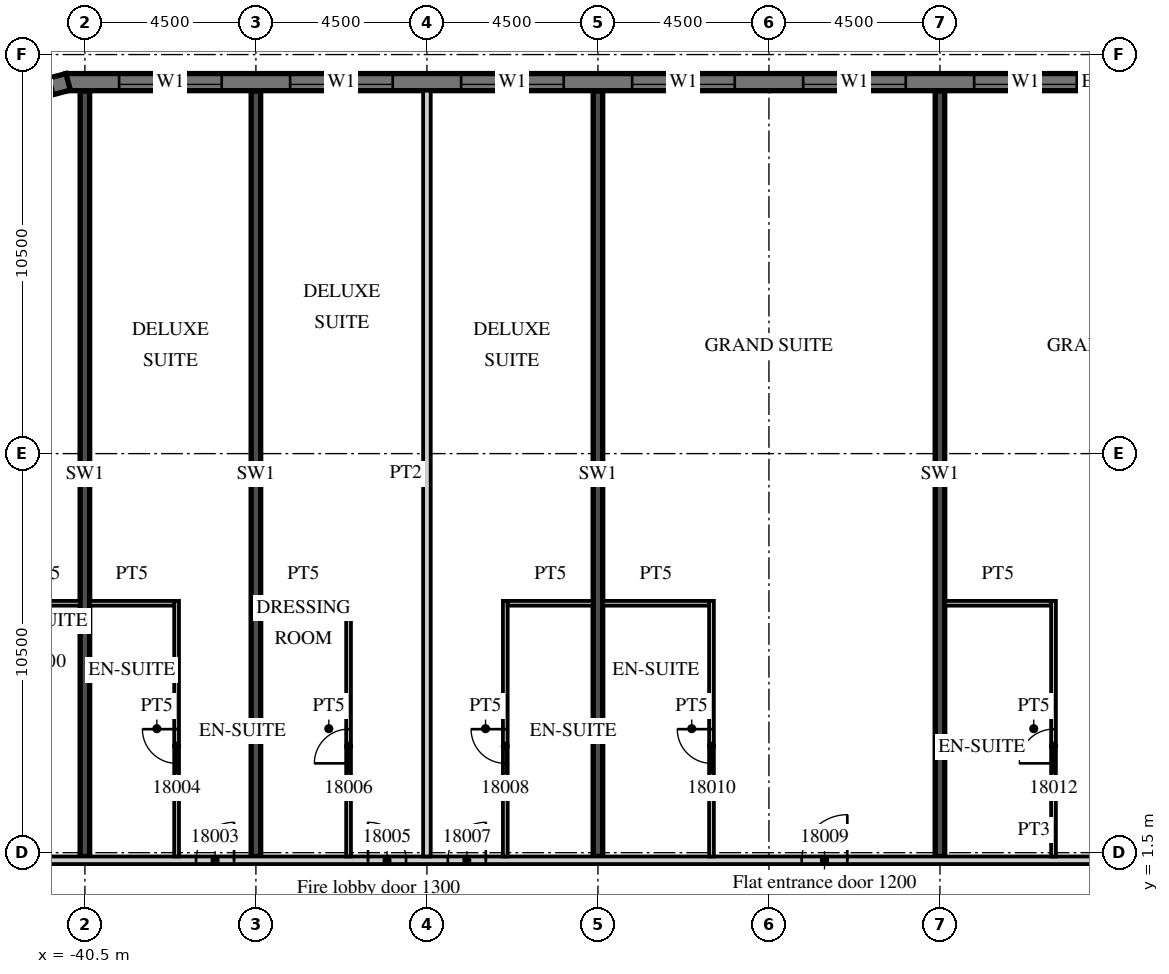
"""IFC4 building model, lengths in metres.
Left out: names, types, materials, properties, quantities, classifications, styles, units other than length and angle.
Written with IfcOpenShell. Run it as: python <this file> out.ifc"""

import sys

from ifc_helpers import new_model, si_unit, direction, frame, frame_2d, origin, place, context, subcontext, project, spatial, polyline, rectangle, outline, extrude, element, fill, save


model = new_model("IFC4")
c1 = context("Model", 3, precision=1e-05, world=origin(), true_north=direction((0.0, 1.0)))
c2 = subcontext(c1, "Body", "Model", "MODEL_VIEW")
j1 = project(units=[si_unit("LENGTHUNIT", "METRE"), si_unit("PLANEANGLEUNIT", "RADIAN")], contexts=[c1])
p1 = place(None, origin())
s1 = spatial("IfcSite", under=j1, at=p1, CompositionType="ELEMENT")
p2 = place(p1, origin())
s2 = spatial("IfcBuilding", under=s1, at=p2, CompositionType="ELEMENT")
p3 = place(p2, frame((0.0, 0.0, 89.7)))
s3 = spatial("IfcBuildingStorey", under=s2, at=p3, CompositionType="ELEMENT", Elevation=89.7)
for number, where, z_axis, x_axis in (
    (1, (-40.5, 1.4, 0.0), (0.0, 0.0, 1.0), (0.0, 1.0, 0.0)),
    (2, (-36.0, 1.4, 0.0), (0.0, 0.0, 1.0), (0.0, 1.0, 0.0)),
    (3, (-27.0, 1.4, 0.0), (0.0, 0.0, 1.0), (0.0, 1.0, 0.0)),
    (4, (-18.0, 1.4, 0.0), (0.0, 0.0, 1.0), (0.0, 1.0, 0.0)),
):
    element("IfcWall", number, at=place(p3, frame(where, z_axis=z_axis, x_axis=x_axis)), inside=s3, PredefinedType="SHEAR", context=c2, shape_type="SweptSolid", body=[
        extrude(rectangle(XDim=20.14, YDim=0.25, at=frame_2d((10.07, 0.0))), origin(), (0.0, 0.0, 1.0), 3.3),
    ])
p4 = place(p3, frame((13.5, 21.775, 0.0), z_axis=(0.0, 0.0, 1.0), x_axis=(-1.0, 0.0, 0.0)))
e5 = element("IfcWall", 5, at=p4, inside=s3, PredefinedType="SOLIDWALL", context=c2, shape_type="SweptSolid", body=[
    extrude(rectangle(XDim=54.5, YDim=0.45, at=frame_2d((27.25, 0.0))), origin(), (0.0, 0.0, 1.0), 3.02),
])
p5 = place(p4, frame((0.9, 0.0, 0.45)))
e6 = element("IfcOpeningElement", 6, at=p5, cuts=e5, PredefinedType="OPENING", context=c2, shape_type="SweptSolid", body=[
    extrude(rectangle(XDim=2.7, YDim=2.25, at=frame_2d((1.35, 1.125))), frame((0.0, 0.235, 0.0), z_axis=(0.0, -1.0, 0.0), x_axis=(1.0, 0.0, 0.0)), (0.0, 0.0, 1.0), 0.47),
])
p6 = place(p4, frame((5.4, 0.0, 0.45)))
e7 = element("IfcOpeningElement", 7, at=p6, cuts=e5, PredefinedType="OPENING", context=c2, shape_type="SweptSolid", body=[
    extrude(rectangle(XDim=2.7, YDim=2.25, at=frame_2d((1.35, 1.125))), frame((0.0, 0.235, 0.0), z_axis=(0.0, -1.0, 0.0), x_axis=(1.0, 0.0, 0.0)), (0.0, 0.0, 1.0), 0.47),
])
p7 = place(p4, frame((9.9, 0.0, 0.45)))
e8 = element("IfcOpeningElement", 8, at=p7, cuts=e5, PredefinedType="OPENING", context=c2, shape_type="SweptSolid", body=[
    extrude(rectangle(XDim=2.7, YDim=2.25, at=frame_2d((1.35, 1.125))), frame((0.0, 0.235, 0.0), z_axis=(0.0, -1.0, 0.0), x_axis=(1.0, 0.0, 0.0)), (0.0, 0.0, 1.0), 0.47),
])
p8 = place(p4, frame((14.4, 0.0, 0.45)))
e9 = element("IfcOpeningElement", 9, at=p8, cuts=e5, PredefinedType="OPENING", context=c2, shape_type="SweptSolid", body=[
    extrude(rectangle(XDim=2.7, YDim=2.25, at=frame_2d((1.35, 1.125))), frame((0.0, 0.235, 0.0), z_axis=(0.0, -1.0, 0.0), x_axis=(1.0, 0.0, 0.0)), (0.0, 0.0, 1.0), 0.47),
])
p9 = place(p4, frame((18.9, 0.0, 0.45)))
e10 = element("IfcOpeningElement", 10, at=p9, cuts=e5, PredefinedType="OPENING", context=c2, shape_type="SweptSolid", body=[
    extrude(rectangle(XDim=2.7, YDim=2.25, at=frame_2d((1.35, 1.125))), frame((0.0, 0.235, 0.0), z_axis=(0.0, -1.0, 0.0), x_axis=(1.0, 0.0, 0.0)), (0.0, 0.0, 1.0), 0.47),
])
p10 = place(p4, frame((23.4, 0.0, 0.45)))
e11 = element("IfcOpeningElement", 11, at=p10, cuts=e5, PredefinedType="OPENING", context=c2, shape_type="SweptSolid", body=[
    extrude(rectangle(XDim=2.7, YDim=2.25, at=frame_2d((1.35, 1.125))), frame((0.0, 0.235, 0.0), z_axis=(0.0, -1.0, 0.0), x_axis=(1.0, 0.0, 0.0)), (0.0, 0.0, 1.0), 0.47),
])
p11 = place(p4, frame((27.9, 0.0, 0.45)))
e12 = element("IfcOpeningElement", 12, at=p11, cuts=e5, PredefinedType="OPENING", context=c2, shape_type="SweptSolid", body=[
    extrude(rectangle(XDim=2.7, YDim=2.25, at=frame_2d((1.35, 1.125))), frame((0.0, 0.235, 0.0), z_axis=(0.0, -1.0, 0.0), x_axis=(1.0, 0.0, 0.0)), (0.0, 0.0, 1.0), 0.47),
])
p12 = place(p4, frame((32.4, 0.0, 0.45)))
e13 = element("IfcOpeningElement", 13, at=p12, cuts=e5, PredefinedType="OPENING", context=c2, shape_type="SweptSolid", body=[
    extrude(rectangle(XDim=2.7, YDim=2.25, at=frame_2d((1.35, 1.125))), frame((0.0, 0.235, 0.0), z_axis=(0.0, -1.0, 0.0), x_axis=(1.0, 0.0, 0.0)), (0.0, 0.0, 1.0), 0.47),
])
p13 = place(p4, frame((36.9, 0.0, 0.45)))
e14 = element("IfcOpeningElement", 14, at=p13, cuts=e5, PredefinedType="OPENING", context=c2, shape_type="SweptSolid", body=[
    extrude(rectangle(XDim=2.7, YDim=2.25, at=frame_2d((1.35, 1.125))), frame((0.0, 0.235, 0.0), z_axis=(0.0, -1.0, 0.0), x_axis=(1.0, 0.0, 0.0)), (0.0, 0.0, 1.0), 0.47),
])
p14 = place(p4, frame((41.4, 0.0, 0.45)))
e15 = element("IfcOpeningElement", 15, at=p14, cuts=e5, PredefinedType="OPENING", context=c2, shape_type="SweptSolid", body=[
    extrude(rectangle(XDim=2.7, YDim=2.25, at=frame_2d((1.35, 1.125))), frame((0.0, 0.235, 0.0), z_axis=(0.0, -1.0, 0.0), x_axis=(1.0, 0.0, 0.0)), (0.0, 0.0, 1.0), 0.47),
])
p15 = place(p4, frame((45.9, 0.0, 0.45)))
e16 = element("IfcOpeningElement", 16, at=p15, cuts=e5, PredefinedType="OPENING", context=c2, shape_type="SweptSolid", body=[
    extrude(rectangle(XDim=2.7, YDim=2.25, at=frame_2d((1.35, 1.125))), frame((0.0, 0.235, 0.0), z_axis=(0.0, -1.0, 0.0), x_axis=(1.0, 0.0, 0.0)), (0.0, 0.0, 1.0), 0.47),
])
p16 = place(p4, frame((50.4, 0.0, 0.45)))
e17 = element("IfcOpeningElement", 17, at=p16, cuts=e5, PredefinedType="OPENING", context=c2, shape_type="SweptSolid", body=[
    extrude(rectangle(XDim=2.7, YDim=2.25, at=frame_2d((1.35, 1.125))), frame((0.0, 0.235, 0.0), z_axis=(0.0, -1.0, 0.0), x_axis=(1.0, 0.0, 0.0)), (0.0, 0.0, 1.0), 0.47),
])
p17 = place(p3, frame((-40.942, 21.783, 0.0), z_axis=(0.0, 0.0, 1.0), x_axis=(-0.965926999034, -0.25881466832, 0.0)))
e18 = element("IfcWall", 18, at=p17, inside=s3, PredefinedType="SOLIDWALL", context=c2, shape_type="SweptSolid", body=[
    extrude(outline(polyline([(0.0, -0.225), (2.071, -0.225), (1.95, 0.225), (0.121, 0.225), (0.0, -0.225)])), origin(), (0.0, 0.0, 1.0), 3.02),
])
p18 = place(p17, frame((0.435, 0.0, 0.45)))
e19 = element("IfcOpeningElement", 19, at=p18, cuts=e18, PredefinedType="OPENING", context=c2, shape_type="SweptSolid", body=[
    extrude(rectangle(XDim=1.2, YDim=2.25, at=frame_2d((0.6, 1.125))), frame((0.0, 0.235, 0.0), z_axis=(0.0, -1.0, 0.0), x_axis=(1.0, 0.0, 0.0)), (0.0, 0.0, 1.0), 0.47),
])
p19 = place(p3, frame((-44.55, 1.3, 0.0), z_axis=(0.0, 0.0, 1.0), x_axis=(1.0, 0.0, 0.0)))
e20 = element("IfcWall", 20, at=p19, inside=s3, PredefinedType="PARTITIONING", context=c2, shape_type="SweptSolid", body=[
    extrude(rectangle(XDim=58.05, YDim=0.2, at=frame_2d((29.025, 0.0))), origin(), (0.0, 0.0, 1.0), 3.02),
])
p20 = place(p19, frame((0.525, 0.0, 0.0)))
e21 = element("IfcOpeningElement", 21, at=p20, cuts=e20, PredefinedType="OPENING", context=c2, shape_type="SweptSolid", body=[
    extrude(rectangle(XDim=1.0, YDim=2.1, at=frame_2d((0.5, 1.05))), frame((0.0, 0.11, 0.0), z_axis=(0.0, -1.0, 0.0), x_axis=(1.0, 0.0, 0.0)), (0.0, 0.0, 1.0), 0.22),
])
p21 = place(p19, frame((6.975, 0.0, 0.0)))
e22 = element("IfcOpeningElement", 22, at=p21, cuts=e20, PredefinedType="OPENING", context=c2, shape_type="SweptSolid", body=[
    extrude(rectangle(XDim=1.0, YDim=2.1, at=frame_2d((0.5, 1.05))), frame((0.0, 0.11, 0.0), z_axis=(0.0, -1.0, 0.0), x_axis=(1.0, 0.0, 0.0)), (0.0, 0.0, 1.0), 0.22),
])
p22 = place(p19, frame((11.5, 0.0, 0.0)))
e23 = element("IfcOpeningElement", 23, at=p22, cuts=e20, PredefinedType="OPENING", context=c2, shape_type="SweptSolid", body=[
    extrude(rectangle(XDim=1.0, YDim=2.1, at=frame_2d((0.5, 1.05))), frame((0.0, 0.11, 0.0), z_axis=(0.0, -1.0, 0.0), x_axis=(1.0, 0.0, 0.0)), (0.0, 0.0, 1.0), 0.22),
])
p23 = place(p19, frame((13.6, 0.0, 0.0)))
e24 = element("IfcOpeningElement", 24, at=p23, cuts=e20, PredefinedType="OPENING", context=c2, shape_type="SweptSolid", body=[
    extrude(rectangle(XDim=1.0, YDim=2.1, at=frame_2d((0.5, 1.05))), frame((0.0, 0.11, 0.0), z_axis=(0.0, -1.0, 0.0), x_axis=(1.0, 0.0, 0.0)), (0.0, 0.0, 1.0), 0.22),
])
p24 = place(p19, frame((22.912, 0.0, 0.0)))
e25 = element("IfcOpeningElement", 25, at=p24, cuts=e20, PredefinedType="OPENING", context=c2, shape_type="SweptSolid", body=[
    extrude(rectangle(XDim=1.2, YDim=2.1, at=frame_2d((0.6, 1.05))), frame((0.0, 0.11, 0.0), z_axis=(0.0, -1.0, 0.0), x_axis=(1.0, 0.0, 0.0)), (0.0, 0.0, 1.0), 0.22),
])
p25 = place(p19, frame((31.912, 0.0, 0.0)))
e26 = element("IfcOpeningElement", 26, at=p25, cuts=e20, PredefinedType="OPENING", context=c2, shape_type="SweptSolid", body=[
    extrude(rectangle(XDim=1.2, YDim=2.1, at=frame_2d((0.6, 1.05))), frame((0.0, 0.11, 0.0), z_axis=(0.0, -1.0, 0.0), x_axis=(1.0, 0.0, 0.0)), (0.0, 0.0, 1.0), 0.22),
])
p26 = place(p19, frame((37.987, 0.0, 0.0)))
e27 = element("IfcOpeningElement", 27, at=p26, cuts=e20, PredefinedType="OPENING", context=c2, shape_type="SweptSolid", body=[
    extrude(rectangle(XDim=1.2, YDim=2.1, at=frame_2d((0.6, 1.05))), frame((0.0, 0.11, 0.0), z_axis=(0.0, -1.0, 0.0), x_axis=(1.0, 0.0, 0.0)), (0.0, 0.0, 1.0), 0.22),
])
p27 = place(p19, frame((46.987, 0.0, 0.0)))
e28 = element("IfcOpeningElement", 28, at=p27, cuts=e20, PredefinedType="OPENING", context=c2, shape_type="SweptSolid", body=[
    extrude(rectangle(XDim=1.2, YDim=2.1, at=frame_2d((0.6, 1.05))), frame((0.0, 0.11, 0.0), z_axis=(0.0, -1.0, 0.0), x_axis=(1.0, 0.0, 0.0)), (0.0, 0.0, 1.0), 0.22),
])
p28 = place(p19, frame((54.125, 0.0, 0.0)))
e29 = element("IfcOpeningElement", 29, at=p28, cuts=e20, PredefinedType="OPENING", context=c2, shape_type="SweptSolid", body=[
    extrude(rectangle(XDim=1.0, YDim=2.1, at=frame_2d((0.5, 1.05))), frame((0.0, 0.11, 0.0), z_axis=(0.0, -1.0, 0.0), x_axis=(1.0, 0.0, 0.0)), (0.0, 0.0, 1.0), 0.22),
])
p29 = place(p3, frame((-42.525, 8.062, 0.0), z_axis=(0.0, 0.0, 1.0), x_axis=(1.0, 0.0, 0.0)))
e30 = element("IfcWall", 30, at=p29, inside=s3, PredefinedType="PARTITIONING", context=c2, shape_type="SweptSolid", body=[
    extrude(rectangle(XDim=1.9, YDim=0.125, at=frame_2d((0.95, 0.0))), origin(), (0.0, 0.0, 1.0), 3.02),
])
p30 = place(p3, frame((-38.087, 1.4, 0.0), z_axis=(0.0, 0.0, 1.0), x_axis=(0.0, 1.0, 0.0)))
e31 = element("IfcWall", 31, at=p30, inside=s3, PredefinedType="PARTITIONING", context=c2, shape_type="SweptSolid", body=[
    extrude(rectangle(XDim=6.725, YDim=0.125, at=frame_2d((3.363, 0.0))), origin(), (0.0, 0.0, 1.0), 3.02),
])
p31 = place(p30, frame((2.45, 0.0, 0.0)))
e32 = element("IfcOpeningElement", 32, at=p31, cuts=e31, PredefinedType="OPENING", context=c2, shape_type="SweptSolid", body=[
    extrude(rectangle(XDim=0.9, YDim=2.1, at=frame_2d((0.45, 1.05))), frame((0.0, 0.073, 0.0), z_axis=(0.0, -1.0, 0.0), x_axis=(1.0, 0.0, 0.0)), (0.0, 0.0, 1.0), 0.145),
])
p32 = place(p3, frame((-40.375, 8.062, 0.0), z_axis=(0.0, 0.0, 1.0), x_axis=(1.0, 0.0, 0.0)))
e33 = element("IfcWall", 33, at=p32, inside=s3, PredefinedType="PARTITIONING", context=c2, shape_type="SweptSolid", body=[
    extrude(rectangle(XDim=2.225, YDim=0.125, at=frame_2d((1.113, 0.0))), origin(), (0.0, 0.0, 1.0), 3.02),
])
p33 = place(p3, frame((-31.5, 1.4, 0.0), z_axis=(0.0, 0.0, 1.0), x_axis=(0.0, 1.0, 0.0)))
e34 = element("IfcWall", 34, at=p33, inside=s3, PredefinedType="PARTITIONING", context=c2, shape_type="SweptSolid", body=[
    extrude(rectangle(XDim=20.15, YDim=0.2, at=frame_2d((10.075, 0.0))), origin(), (0.0, 0.0, 1.0), 3.02),
])
p34 = place(p3, frame((-33.562, 1.4, 0.0), z_axis=(0.0, 0.0, 1.0), x_axis=(0.0, 1.0, 0.0)))
e35 = element("IfcWall", 35, at=p34, inside=s3, PredefinedType="PARTITIONING", context=c2, shape_type="SweptSolid", body=[
    extrude(rectangle(XDim=6.725, YDim=0.125, at=frame_2d((3.363, 0.0))), origin(), (0.0, 0.0, 1.0), 3.02),
])
p35 = place(p34, frame((2.45, 0.0, 0.0)))
e36 = element("IfcOpeningElement", 36, at=p35, cuts=e35, PredefinedType="OPENING", context=c2, shape_type="SweptSolid", body=[
    extrude(rectangle(XDim=0.9, YDim=2.1, at=frame_2d((0.45, 1.05))), frame((0.0, 0.073, 0.0), z_axis=(0.0, -1.0, 0.0), x_axis=(1.0, 0.0, 0.0)), (0.0, 0.0, 1.0), 0.145),
])
p36 = place(p3, frame((-35.875, 8.062, 0.0), z_axis=(0.0, 0.0, 1.0), x_axis=(1.0, 0.0, 0.0)))
e37 = element("IfcWall", 37, at=p36, inside=s3, PredefinedType="PARTITIONING", context=c2, shape_type="SweptSolid", body=[
    extrude(rectangle(XDim=2.25, YDim=0.125, at=frame_2d((1.125, 0.0))), origin(), (0.0, 0.0, 1.0), 3.02),
])
p37 = place(p3, frame((-29.438, 1.4, 0.0), z_axis=(0.0, 0.0, 1.0), x_axis=(0.0, 1.0, 0.0)))
e38 = element("IfcWall", 38, at=p37, inside=s3, PredefinedType="PARTITIONING", context=c2, shape_type="SweptSolid", body=[
    extrude(rectangle(XDim=6.725, YDim=0.125, at=frame_2d((3.363, 0.0))), origin(), (0.0, 0.0, 1.0), 3.02),
])
p38 = place(p37, frame((2.45, 0.0, 0.0)))
e39 = element("IfcOpeningElement", 39, at=p38, cuts=e38, PredefinedType="OPENING", context=c2, shape_type="SweptSolid", body=[
    extrude(rectangle(XDim=0.9, YDim=2.1, at=frame_2d((0.45, 1.05))), frame((0.0, 0.073, 0.0), z_axis=(0.0, -1.0, 0.0), x_axis=(1.0, 0.0, 0.0)), (0.0, 0.0, 1.0), 0.145),
])
p39 = place(p3, frame((-29.375, 8.062, 0.0), z_axis=(0.0, 0.0, 1.0), x_axis=(1.0, 0.0, 0.0)))
e40 = element("IfcWall", 40, at=p39, inside=s3, PredefinedType="PARTITIONING", context=c2, shape_type="SweptSolid", body=[
    extrude(rectangle(XDim=2.25, YDim=0.125, at=frame_2d((1.125, 0.0))), origin(), (0.0, 0.0, 1.0), 3.02),
])
p40 = place(p3, frame((-24.012, 1.4, 0.0), z_axis=(0.0, 0.0, 1.0), x_axis=(0.0, 1.0, 0.0)))
e41 = element("IfcWall", 41, at=p40, inside=s3, PredefinedType="PARTITIONING", context=c2, shape_type="SweptSolid", body=[
    extrude(rectangle(XDim=6.725, YDim=0.125, at=frame_2d((3.363, 0.0))), origin(), (0.0, 0.0, 1.0), 3.02),
])
p41 = place(p40, frame((2.45, 0.0, 0.0)))
e42 = element("IfcOpeningElement", 42, at=p41, cuts=e41, PredefinedType="OPENING", context=c2, shape_type="SweptSolid", body=[
    extrude(rectangle(XDim=0.9, YDim=2.1, at=frame_2d((0.45, 1.05))), frame((0.0, 0.073, 0.0), z_axis=(0.0, -1.0, 0.0), x_axis=(1.0, 0.0, 0.0)), (0.0, 0.0, 1.0), 0.145),
])
p42 = place(p3, frame((-26.875, 8.062, 0.0), z_axis=(0.0, 0.0, 1.0), x_axis=(1.0, 0.0, 0.0)))
e43 = element("IfcWall", 43, at=p42, inside=s3, PredefinedType="PARTITIONING", context=c2, shape_type="SweptSolid", body=[
    extrude(rectangle(XDim=2.8, YDim=0.125, at=frame_2d((1.4, 0.0))), origin(), (0.0, 0.0, 1.0), 3.02),
])
p43 = place(p3, frame((-15.012, 1.4, 0.0), z_axis=(0.0, 0.0, 1.0), x_axis=(0.0, 1.0, 0.0)))
e44 = element("IfcWall", 44, at=p43, inside=s3, PredefinedType="PARTITIONING", context=c2, shape_type="SweptSolid", body=[
    extrude(rectangle(XDim=6.725, YDim=0.125, at=frame_2d((3.363, 0.0))), origin(), (0.0, 0.0, 1.0), 3.02),
])
p44 = place(p43, frame((2.45, 0.0, 0.0)))
e45 = element("IfcOpeningElement", 45, at=p44, cuts=e44, PredefinedType="OPENING", context=c2, shape_type="SweptSolid", body=[
    extrude(rectangle(XDim=0.9, YDim=2.1, at=frame_2d((0.45, 1.05))), frame((0.0, 0.073, 0.0), z_axis=(0.0, -1.0, 0.0), x_axis=(1.0, 0.0, 0.0)), (0.0, 0.0, 1.0), 0.145),
])
p45 = place(p3, frame((-17.875, 8.062, 0.0), z_axis=(0.0, 0.0, 1.0), x_axis=(1.0, 0.0, 0.0)))
e46 = element("IfcWall", 46, at=p45, inside=s3, PredefinedType="PARTITIONING", context=c2, shape_type="SweptSolid", body=[
    extrude(rectangle(XDim=2.8, YDim=0.125, at=frame_2d((1.4, 0.0))), origin(), (0.0, 0.0, 1.0), 3.02),
])
p46 = place(p11, origin())
e47 = element("IfcWindow", 47, at=p46, inside=s3, PartitioningType="SINGLE_PANEL", PredefinedType="WINDOW", context=c2, shape_type="SweptSolid", body=[
    extrude(rectangle(XDim=2.7, YDim=2.25, at=frame_2d((1.35, 1.125))), frame((0.0, 0.09, 0.0), z_axis=(0.0, -1.0, 0.0), x_axis=(1.0, 0.0, 0.0)), (0.0, 0.0, 1.0), 0.06),
])
fill(e12, e47)
p47 = place(p12, origin())
e48 = element("IfcWindow", 48, at=p47, inside=s3, PartitioningType="SINGLE_PANEL", PredefinedType="WINDOW", context=c2, shape_type="SweptSolid", body=[
    extrude(rectangle(XDim=2.7, YDim=2.25, at=frame_2d((1.35, 1.125))), frame((0.0, 0.09, 0.0), z_axis=(0.0, -1.0, 0.0), x_axis=(1.0, 0.0, 0.0)), (0.0, 0.0, 1.0), 0.06),
])
fill(e13, e48)
p48 = place(p13, origin())
e49 = element("IfcWindow", 49, at=p48, inside=s3, PartitioningType="SINGLE_PANEL", PredefinedType="WINDOW", context=c2, shape_type="SweptSolid", body=[
    extrude(rectangle(XDim=2.7, YDim=2.25, at=frame_2d((1.35, 1.125))), frame((0.0, 0.09, 0.0), z_axis=(0.0, -1.0, 0.0), x_axis=(1.0, 0.0, 0.0)), (0.0, 0.0, 1.0), 0.06),
])
fill(e14, e49)
p49 = place(p14, origin())
e50 = element("IfcWindow", 50, at=p49, inside=s3, PartitioningType="SINGLE_PANEL", PredefinedType="WINDOW", context=c2, shape_type="SweptSolid", body=[
    extrude(rectangle(XDim=2.7, YDim=2.25, at=frame_2d((1.35, 1.125))), frame((0.0, 0.09, 0.0), z_axis=(0.0, -1.0, 0.0), x_axis=(1.0, 0.0, 0.0)), (0.0, 0.0, 1.0), 0.06),
])
fill(e15, e50)
p50 = place(p15, origin())
e51 = element("IfcWindow", 51, at=p50, inside=s3, PartitioningType="SINGLE_PANEL", PredefinedType="WINDOW", context=c2, shape_type="SweptSolid", body=[
    extrude(rectangle(XDim=2.7, YDim=2.25, at=frame_2d((1.35, 1.125))), frame((0.0, 0.09, 0.0), z_axis=(0.0, -1.0, 0.0), x_axis=(1.0, 0.0, 0.0)), (0.0, 0.0, 1.0), 0.06),
])
fill(e16, e51)
p51 = place(p16, origin())
e52 = element("IfcWindow", 52, at=p51, inside=s3, PartitioningType="SINGLE_PANEL", PredefinedType="WINDOW", context=c2, shape_type="SweptSolid", body=[
    extrude(rectangle(XDim=2.7, YDim=2.25, at=frame_2d((1.35, 1.125))), frame((0.0, 0.09, 0.0), z_axis=(0.0, -1.0, 0.0), x_axis=(1.0, 0.0, 0.0)), (0.0, 0.0, 1.0), 0.06),
])
fill(e17, e52)
p52 = place(p18, origin())
e53 = element("IfcWindow", 53, at=p52, inside=s3, PartitioningType="SINGLE_PANEL", PredefinedType="WINDOW", context=c2, shape_type="SweptSolid", body=[
    extrude(rectangle(XDim=1.2, YDim=2.25, at=frame_2d((0.6, 1.125))), frame((0.0, 0.09, 0.0), z_axis=(0.0, -1.0, 0.0), x_axis=(1.0, 0.0, 0.0)), (0.0, 0.0, 1.0), 0.06),
])
fill(e19, e53)
p53 = place(p21, origin())
e54 = element("IfcDoor", 54, at=p53, inside=s3, OperationType="SINGLE_SWING_RIGHT", PredefinedType="DOOR", context=c2, shape_type="SweptSolid", body=[
    extrude(rectangle(XDim=1.0, YDim=2.1, at=frame_2d((0.5, 1.05))), frame((0.0, 0.025, 0.0), z_axis=(0.0, -1.0, 0.0), x_axis=(1.0, 0.0, 0.0)), (0.0, 0.0, 1.0), 0.05),
])
fill(e22, e54)
p54 = place(p31, origin())
e55 = element("IfcDoor", 55, at=p54, inside=s3, OperationType="SINGLE_SWING_RIGHT", PredefinedType="DOOR", context=c2, shape_type="SweptSolid", body=[
    extrude(rectangle(XDim=0.9, YDim=2.1, at=frame_2d((0.45, 1.05))), frame((0.0, 0.025, 0.0), z_axis=(0.0, -1.0, 0.0), x_axis=(1.0, 0.0, 0.0)), (0.0, 0.0, 1.0), 0.05),
])
fill(e32, e55)
p55 = place(p22, origin())
e56 = element("IfcDoor", 56, at=p55, inside=s3, OperationType="SINGLE_SWING_LEFT", PredefinedType="DOOR", context=c2, shape_type="SweptSolid", body=[
    extrude(rectangle(XDim=1.0, YDim=2.1, at=frame_2d((0.5, 1.05))), frame((0.0, 0.025, 0.0), z_axis=(0.0, -1.0, 0.0), x_axis=(1.0, 0.0, 0.0)), (0.0, 0.0, 1.0), 0.05),
])
fill(e23, e56)
p56 = place(p35, origin())
e57 = element("IfcDoor", 57, at=p56, inside=s3, OperationType="SINGLE_SWING_LEFT", PredefinedType="DOOR", context=c2, shape_type="SweptSolid", body=[
    extrude(rectangle(XDim=0.9, YDim=2.1, at=frame_2d((0.45, 1.05))), frame((0.0, 0.025, 0.0), z_axis=(0.0, -1.0, 0.0), x_axis=(1.0, 0.0, 0.0)), (0.0, 0.0, 1.0), 0.05),
])
fill(e36, e57)
p57 = place(p23, origin())
e58 = element("IfcDoor", 58, at=p57, inside=s3, OperationType="SINGLE_SWING_RIGHT", PredefinedType="DOOR", context=c2, shape_type="SweptSolid", body=[
    extrude(rectangle(XDim=1.0, YDim=2.1, at=frame_2d((0.5, 1.05))), frame((0.0, 0.025, 0.0), z_axis=(0.0, -1.0, 0.0), x_axis=(1.0, 0.0, 0.0)), (0.0, 0.0, 1.0), 0.05),
])
fill(e24, e58)
p58 = place(p38, origin())
e59 = element("IfcDoor", 59, at=p58, inside=s3, OperationType="SINGLE_SWING_RIGHT", PredefinedType="DOOR", context=c2, shape_type="SweptSolid", body=[
    extrude(rectangle(XDim=0.9, YDim=2.1, at=frame_2d((0.45, 1.05))), frame((0.0, 0.025, 0.0), z_axis=(0.0, -1.0, 0.0), x_axis=(1.0, 0.0, 0.0)), (0.0, 0.0, 1.0), 0.05),
])
fill(e39, e59)
p59 = place(p24, origin())
e60 = element("IfcDoor", 60, at=p59, inside=s3, OperationType="SINGLE_SWING_RIGHT", PredefinedType="DOOR", context=c2, shape_type="SweptSolid", body=[
    extrude(rectangle(XDim=1.2, YDim=2.1, at=frame_2d((0.6, 1.05))), frame((0.0, 0.025, 0.0), z_axis=(0.0, -1.0, 0.0), x_axis=(1.0, 0.0, 0.0)), (0.0, 0.0, 1.0), 0.05),
])
fill(e25, e60)
p60 = place(p41, origin())
e61 = element("IfcDoor", 61, at=p60, inside=s3, OperationType="SINGLE_SWING_RIGHT", PredefinedType="DOOR", context=c2, shape_type="SweptSolid", body=[
    extrude(rectangle(XDim=0.9, YDim=2.1, at=frame_2d((0.45, 1.05))), frame((0.0, 0.025, 0.0), z_axis=(0.0, -1.0, 0.0), x_axis=(1.0, 0.0, 0.0)), (0.0, 0.0, 1.0), 0.05),
])
fill(e42, e61)
p61 = place(p44, origin())
e62 = element("IfcDoor", 62, at=p61, inside=s3, OperationType="SINGLE_SWING_LEFT", PredefinedType="DOOR", context=c2, shape_type="SweptSolid", body=[
    extrude(rectangle(XDim=0.9, YDim=2.1, at=frame_2d((0.45, 1.05))), frame((0.0, 0.025, 0.0), z_axis=(0.0, -1.0, 0.0), x_axis=(1.0, 0.0, 0.0)), (0.0, 0.0, 1.0), 0.05),
])
fill(e45, e62)
save(model, sys.argv[1])
